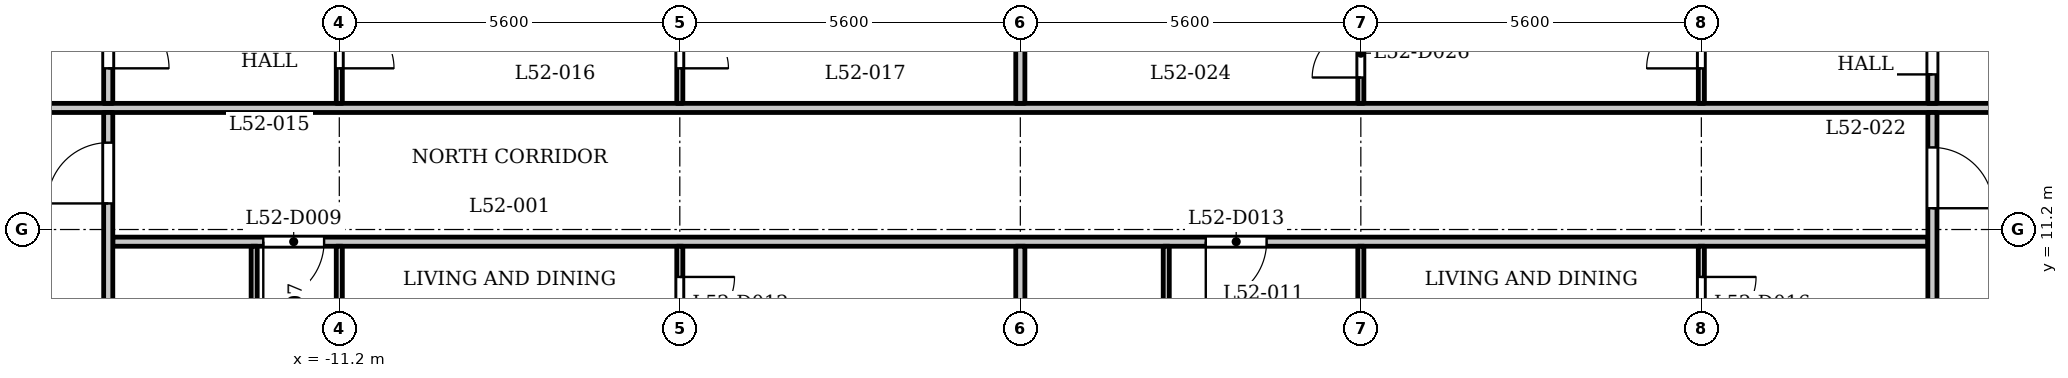
"""IFC4 building model, lengths in metres.
Left out: names, types, materials, properties, quantities, classifications, styles, units other than length and angle.
Written with IfcOpenShell. Run it as: python <this file> out.ifc"""

import sys

from ifc_helpers import new_model, si_unit, direction, frame, frame_2d, origin, place, context, subcontext, project, spatial, rectangle, extrude, element, fill, save


model = new_model("IFC4")
c1 = context("Model", 3, precision=1e-05, world=origin(), true_north=direction((0.0, 1.0)))
c2 = subcontext(c1, "Body", "Model", "MODEL_VIEW")
j1 = project(units=[si_unit("LENGTHUNIT", "METRE"), si_unit("PLANEANGLEUNIT", "RADIAN")], contexts=[c1])
p1 = place(None, origin())
s1 = spatial("IfcSite", under=j1, at=p1, CompositionType="ELEMENT")
p2 = place(p1, origin())
s2 = spatial("IfcBuilding", under=s1, at=p2, CompositionType="ELEMENT")
p3 = place(p2, frame((0.0, 0.0, 202.9)))
s3 = spatial("IfcBuildingStorey", under=s2, at=p3, CompositionType="ELEMENT", Elevation=202.9)
p4 = place(p3, frame((-14.925, 11.0, 0.0), z_axis=(0.0, 0.0, 1.0), x_axis=(1.0, 0.0, 0.0)))
e1 = element("IfcWall", 1, at=p4, inside=s3, PredefinedType="PARTITIONING", context=c2, shape_type="SweptSolid", body=[
    extrude(rectangle(XDim=29.85, YDim=0.15, at=frame_2d((14.925, 0.0))), origin(), (0.0, 0.0, 1.0), 3.2),
])
p5 = place(p4, frame((2.475, 0.0, 0.0)))
e2 = element("IfcOpeningElement", 2, at=p5, cuts=e1, PredefinedType="OPENING", context=c2, shape_type="SweptSolid", body=[
    extrude(rectangle(XDim=1.0, YDim=2.1, at=frame_2d((0.5, 1.05))), frame((0.0, 0.085, 0.0), z_axis=(0.0, -1.0, 0.0), x_axis=(1.0, 0.0, 0.0)), (0.0, 0.0, 1.0), 0.17),
])
p6 = place(p4, frame((17.975, 0.0, 0.0)))
e3 = element("IfcOpeningElement", 3, at=p6, cuts=e1, PredefinedType="OPENING", context=c2, shape_type="SweptSolid", body=[
    extrude(rectangle(XDim=1.0, YDim=2.1, at=frame_2d((0.5, 1.05))), frame((0.0, 0.085, 0.0), z_axis=(0.0, -1.0, 0.0), x_axis=(1.0, 0.0, 0.0)), (0.0, 0.0, 1.0), 0.17),
])
p7 = place(p3, frame((-17.4, 13.2, 0.0), z_axis=(0.0, 0.0, 1.0), x_axis=(1.0, 0.0, 0.0)))
e4 = element("IfcWall", 4, at=p7, inside=s3, PredefinedType="PARTITIONING", context=c2, shape_type="SweptSolid", body=[
    extrude(rectangle(XDim=34.8, YDim=0.15, at=frame_2d((17.4, 0.0))), origin(), (0.0, 0.0, 1.0), 3.2),
])
p8 = place(p7, frame((0.25, 0.0, 0.0)))
e5 = element("IfcOpeningElement", 5, at=p8, cuts=e4, PredefinedType="OPENING", context=c2, shape_type="SweptSolid", body=[
    extrude(rectangle(XDim=1.0, YDim=2.1, at=frame_2d((0.5, 1.05))), frame((0.0, 0.085, 0.0), z_axis=(0.0, -1.0, 0.0), x_axis=(1.0, 0.0, 0.0)), (0.0, 0.0, 1.0), 0.17),
])
p9 = place(p7, frame((33.65, 0.0, 0.0)))
e6 = element("IfcOpeningElement", 6, at=p9, cuts=e4, PredefinedType="OPENING", context=c2, shape_type="SweptSolid", body=[
    extrude(rectangle(XDim=1.0, YDim=2.1, at=frame_2d((0.5, 1.05))), frame((0.0, 0.085, 0.0), z_axis=(0.0, -1.0, 0.0), x_axis=(1.0, 0.0, 0.0)), (0.0, 0.0, 1.0), 0.17),
])
p10 = place(p3, frame((-15.0, 6.769, 0.0), z_axis=(0.0, 0.0, 1.0), x_axis=(0.0, 1.0, 0.0)))
e7 = element("IfcWall", 7, at=p10, inside=s3, PredefinedType="PARTITIONING", context=c2, shape_type="SweptSolid", body=[
    extrude(rectangle(XDim=6.356, YDim=0.15, at=frame_2d((3.178, 0.0))), origin(), (0.0, 0.0, 1.0), 3.2),
])
p11 = place(p10, frame((4.86, 0.0, 0.0)))
e8 = element("IfcOpeningElement", 8, at=p11, cuts=e7, PredefinedType="OPENING", context=c2, shape_type="SweptSolid", body=[
    extrude(rectangle(XDim=1.0, YDim=2.1, at=frame_2d((0.5, 1.05))), frame((0.0, 0.085, 0.0), z_axis=(0.0, -1.0, 0.0), x_axis=(1.0, 0.0, 0.0)), (0.0, 0.0, 1.0), 0.17),
])
p12 = place(p3, frame((-15.0, 13.275, 0.0), z_axis=(0.0, 0.0, 1.0), x_axis=(0.0, 1.0, 0.0)))
e9 = element("IfcWall", 9, at=p12, inside=s3, PredefinedType="PARTITIONING", context=c2, shape_type="SweptSolid", body=[
    extrude(rectangle(XDim=2.05, YDim=0.15, at=frame_2d((1.025, 0.0))), origin(), (0.0, 0.0, 1.0), 3.2),
])
p13 = place(p12, frame((0.576, 0.0, 0.0)))
e10 = element("IfcOpeningElement", 10, at=p13, cuts=e9, PredefinedType="OPENING", context=c2, shape_type="SweptSolid", body=[
    extrude(rectangle(XDim=1.0, YDim=2.1, at=frame_2d((0.5, 1.05))), frame((0.0, 0.085, 0.0), z_axis=(0.0, -1.0, 0.0), x_axis=(1.0, 0.0, 0.0)), (0.0, 0.0, 1.0), 0.17),
])
p14 = place(p3, frame((-12.6, 7.32, 0.0), z_axis=(0.0, 0.0, 1.0), x_axis=(0.0, 1.0, 0.0)))
e11 = element("IfcWall", 11, at=p14, inside=s3, PredefinedType="PARTITIONING", context=c2, shape_type="SweptSolid", body=[
    extrude(rectangle(XDim=3.605, YDim=0.1, at=frame_2d((1.802, 0.0))), origin(), (0.0, 0.0, 1.0), 3.2),
])
p15 = place(p14, frame((1.729, 0.0, 0.0)))
e12 = element("IfcOpeningElement", 12, at=p15, cuts=e11, PredefinedType="OPENING", context=c2, shape_type="SweptSolid", body=[
    extrude(rectangle(XDim=0.8, YDim=2.1, at=frame_2d((0.4, 1.05))), frame((0.0, 0.06, 0.0), z_axis=(0.0, -1.0, 0.0), x_axis=(1.0, 0.0, 0.0)), (0.0, 0.0, 1.0), 0.12),
])
p16 = place(p3, frame((-11.2, 7.32, 0.0), z_axis=(0.0, 0.0, 1.0), x_axis=(0.0, 1.0, 0.0)))
e13 = element("IfcWall", 13, at=p16, inside=s3, PredefinedType="PARTITIONING", context=c2, shape_type="SweptSolid", body=[
    extrude(rectangle(XDim=3.605, YDim=0.1, at=frame_2d((1.802, 0.0))), origin(), (0.0, 0.0, 1.0), 3.2),
])
p17 = place(p16, frame((1.7, 0.0, 0.0)))
e14 = element("IfcOpeningElement", 14, at=p17, cuts=e13, PredefinedType="OPENING", context=c2, shape_type="SweptSolid", body=[
    extrude(rectangle(XDim=0.9, YDim=2.1, at=frame_2d((0.45, 1.05))), frame((0.0, 0.06, 0.0), z_axis=(0.0, -1.0, 0.0), x_axis=(1.0, 0.0, 0.0)), (0.0, 0.0, 1.0), 0.12),
])
p18 = place(p3, frame((-11.2, 13.275, 0.0), z_axis=(0.0, 0.0, 1.0), x_axis=(0.0, 1.0, 0.0)))
e15 = element("IfcWall", 15, at=p18, inside=s3, PredefinedType="PARTITIONING", context=c2, shape_type="SweptSolid", body=[
    extrude(rectangle(XDim=2.575, YDim=0.1, at=frame_2d((1.288, 0.0))), origin(), (0.0, 0.0, 1.0), 3.2),
])
p19 = place(p18, frame((0.576, 0.0, 0.0)))
e16 = element("IfcOpeningElement", 16, at=p19, cuts=e15, PredefinedType="OPENING", context=c2, shape_type="SweptSolid", body=[
    extrude(rectangle(XDim=0.9, YDim=2.1, at=frame_2d((0.45, 1.05))), frame((0.0, 0.06, 0.0), z_axis=(0.0, -1.0, 0.0), x_axis=(1.0, 0.0, 0.0)), (0.0, 0.0, 1.0), 0.12),
])
p20 = place(p3, frame((-5.6, 7.32, 0.0), z_axis=(0.0, 0.0, 1.0), x_axis=(0.0, 1.0, 0.0)))
e17 = element("IfcWall", 17, at=p20, inside=s3, PredefinedType="PARTITIONING", context=c2, shape_type="SweptSolid", body=[
    extrude(rectangle(XDim=3.605, YDim=0.1, at=frame_2d((1.802, 0.0))), origin(), (0.0, 0.0, 1.0), 3.2),
])
p21 = place(p20, frame((2.2, 0.0, 0.0)))
e18 = element("IfcOpeningElement", 18, at=p21, cuts=e17, PredefinedType="OPENING", context=c2, shape_type="SweptSolid", body=[
    extrude(rectangle(XDim=0.9, YDim=2.1, at=frame_2d((0.45, 1.05))), frame((0.0, 0.06, 0.0), z_axis=(0.0, -1.0, 0.0), x_axis=(1.0, 0.0, 0.0)), (0.0, 0.0, 1.0), 0.12),
])
p22 = place(p3, frame((-5.6, 13.275, 0.0), z_axis=(0.0, 0.0, 1.0), x_axis=(0.0, 1.0, 0.0)))
e19 = element("IfcWall", 19, at=p22, inside=s3, PredefinedType="PARTITIONING", context=c2, shape_type="SweptSolid", body=[
    extrude(rectangle(XDim=2.575, YDim=0.1, at=frame_2d((1.288, 0.0))), origin(), (0.0, 0.0, 1.0), 3.2),
])
p23 = place(p22, frame((0.576, 0.0, 0.0)))
e20 = element("IfcOpeningElement", 20, at=p23, cuts=e19, PredefinedType="OPENING", context=c2, shape_type="SweptSolid", body=[
    extrude(rectangle(XDim=0.8, YDim=2.1, at=frame_2d((0.4, 1.05))), frame((0.0, 0.06, 0.0), z_axis=(0.0, -1.0, 0.0), x_axis=(1.0, 0.0, 0.0)), (0.0, 0.0, 1.0), 0.12),
])
p24 = place(p3, frame((0.0, 7.32, 0.0), z_axis=(0.0, 0.0, 1.0), x_axis=(0.0, 1.0, 0.0)))
e21 = element("IfcWall", 21, at=p24, inside=s3, PredefinedType="PARTITIONING", context=c2, shape_type="SweptSolid", body=[
    extrude(rectangle(XDim=3.605, YDim=0.15, at=frame_2d((1.802, 0.0))), origin(), (0.0, 0.0, 1.0), 3.2),
])
p25 = place(p3, frame((0.0, 13.275, 0.0), z_axis=(0.0, 0.0, 1.0), x_axis=(0.0, 1.0, 0.0)))
e22 = element("IfcWall", 22, at=p25, inside=s3, PredefinedType="PARTITIONING", context=c2, shape_type="SweptSolid", body=[
    extrude(rectangle(XDim=2.575, YDim=0.15, at=frame_2d((1.288, 0.0))), origin(), (0.0, 0.0, 1.0), 3.2),
])
p26 = place(p3, frame((2.4, 7.32, 0.0), z_axis=(0.0, 0.0, 1.0), x_axis=(0.0, 1.0, 0.0)))
e23 = element("IfcWall", 23, at=p26, inside=s3, PredefinedType="PARTITIONING", context=c2, shape_type="SweptSolid", body=[
    extrude(rectangle(XDim=3.605, YDim=0.1, at=frame_2d((1.802, 0.0))), origin(), (0.0, 0.0, 1.0), 3.2),
])
p27 = place(p26, frame((0.479, 0.0, 0.0)))
e24 = element("IfcOpeningElement", 24, at=p27, cuts=e23, PredefinedType="OPENING", context=c2, shape_type="SweptSolid", body=[
    extrude(rectangle(XDim=0.8, YDim=2.1, at=frame_2d((0.4, 1.05))), frame((0.0, 0.06, 0.0), z_axis=(0.0, -1.0, 0.0), x_axis=(1.0, 0.0, 0.0)), (0.0, 0.0, 1.0), 0.12),
])
p28 = place(p3, frame((5.6, 7.32, 0.0), z_axis=(0.0, 0.0, 1.0), x_axis=(0.0, 1.0, 0.0)))
e25 = element("IfcWall", 25, at=p28, inside=s3, PredefinedType="PARTITIONING", context=c2, shape_type="SweptSolid", body=[
    extrude(rectangle(XDim=3.605, YDim=0.1, at=frame_2d((1.802, 0.0))), origin(), (0.0, 0.0, 1.0), 3.2),
])
p29 = place(p28, frame((1.7, 0.0, 0.0)))
e26 = element("IfcOpeningElement", 26, at=p29, cuts=e25, PredefinedType="OPENING", context=c2, shape_type="SweptSolid", body=[
    extrude(rectangle(XDim=0.9, YDim=2.1, at=frame_2d((0.45, 1.05))), frame((0.0, 0.06, 0.0), z_axis=(0.0, -1.0, 0.0), x_axis=(1.0, 0.0, 0.0)), (0.0, 0.0, 1.0), 0.12),
])
p30 = place(p3, frame((5.6, 13.275, 0.0), z_axis=(0.0, 0.0, 1.0), x_axis=(0.0, 1.0, 0.0)))
e27 = element("IfcWall", 27, at=p30, inside=s3, PredefinedType="PARTITIONING", context=c2, shape_type="SweptSolid", body=[
    extrude(rectangle(XDim=2.575, YDim=0.1, at=frame_2d((1.288, 0.0))), origin(), (0.0, 0.0, 1.0), 3.2),
])
p31 = place(p30, frame((0.425, 0.0, 0.0)))
e28 = element("IfcOpeningElement", 28, at=p31, cuts=e27, PredefinedType="OPENING", context=c2, shape_type="SweptSolid", body=[
    extrude(rectangle(XDim=0.8, YDim=2.1, at=frame_2d((0.4, 1.05))), frame((0.0, 0.06, 0.0), z_axis=(0.0, -1.0, 0.0), x_axis=(1.0, 0.0, 0.0)), (0.0, 0.0, 1.0), 0.12),
])
p32 = place(p3, frame((11.2, 7.32, 0.0), z_axis=(0.0, 0.0, 1.0), x_axis=(0.0, 1.0, 0.0)))
e29 = element("IfcWall", 29, at=p32, inside=s3, PredefinedType="PARTITIONING", context=c2, shape_type="SweptSolid", body=[
    extrude(rectangle(XDim=3.605, YDim=0.1, at=frame_2d((1.802, 0.0))), origin(), (0.0, 0.0, 1.0), 3.2),
])
p33 = place(p32, frame((2.2, 0.0, 0.0)))
e30 = element("IfcOpeningElement", 30, at=p33, cuts=e29, PredefinedType="OPENING", context=c2, shape_type="SweptSolid", body=[
    extrude(rectangle(XDim=0.9, YDim=2.1, at=frame_2d((0.45, 1.05))), frame((0.0, 0.06, 0.0), z_axis=(0.0, -1.0, 0.0), x_axis=(1.0, 0.0, 0.0)), (0.0, 0.0, 1.0), 0.12),
])
p34 = place(p3, frame((11.2, 13.275, 0.0), z_axis=(0.0, 0.0, 1.0), x_axis=(0.0, 1.0, 0.0)))
e31 = element("IfcWall", 31, at=p34, inside=s3, PredefinedType="PARTITIONING", context=c2, shape_type="SweptSolid", body=[
    extrude(rectangle(XDim=2.575, YDim=0.1, at=frame_2d((1.288, 0.0))), origin(), (0.0, 0.0, 1.0), 3.2),
])
p35 = place(p34, frame((0.575, 0.0, 0.0)))
e32 = element("IfcOpeningElement", 32, at=p35, cuts=e31, PredefinedType="OPENING", context=c2, shape_type="SweptSolid", body=[
    extrude(rectangle(XDim=0.9, YDim=2.1, at=frame_2d((0.45, 1.05))), frame((0.0, 0.06, 0.0), z_axis=(0.0, -1.0, 0.0), x_axis=(1.0, 0.0, 0.0)), (0.0, 0.0, 1.0), 0.12),
])
p36 = place(p3, frame((15.0, 6.769, 0.0), z_axis=(0.0, 0.0, 1.0), x_axis=(0.0, 1.0, 0.0)))
e33 = element("IfcWall", 33, at=p36, inside=s3, PredefinedType="PARTITIONING", context=c2, shape_type="SweptSolid", body=[
    extrude(rectangle(XDim=6.356, YDim=0.15, at=frame_2d((3.178, 0.0))), origin(), (0.0, 0.0, 1.0), 3.2),
])
p37 = place(p36, frame((4.781, 0.0, 0.0)))
e34 = element("IfcOpeningElement", 34, at=p37, cuts=e33, PredefinedType="OPENING", context=c2, shape_type="SweptSolid", body=[
    extrude(rectangle(XDim=1.0, YDim=2.1, at=frame_2d((0.5, 1.05))), frame((0.0, 0.085, 0.0), z_axis=(0.0, -1.0, 0.0), x_axis=(1.0, 0.0, 0.0)), (0.0, 0.0, 1.0), 0.17),
])
p38 = place(p3, frame((15.0, 13.275, 0.0), z_axis=(0.0, 0.0, 1.0), x_axis=(0.0, 1.0, 0.0)))
e35 = element("IfcWall", 35, at=p38, inside=s3, PredefinedType="PARTITIONING", context=c2, shape_type="SweptSolid", body=[
    extrude(rectangle(XDim=2.05, YDim=0.15, at=frame_2d((1.025, 0.0))), origin(), (0.0, 0.0, 1.0), 3.2),
])
p39 = place(p38, frame((0.476, 0.0, 0.0)))
e36 = element("IfcOpeningElement", 36, at=p39, cuts=e35, PredefinedType="OPENING", context=c2, shape_type="SweptSolid", body=[
    extrude(rectangle(XDim=1.0, YDim=2.1, at=frame_2d((0.5, 1.05))), frame((0.0, 0.085, 0.0), z_axis=(0.0, -1.0, 0.0), x_axis=(1.0, 0.0, 0.0)), (0.0, 0.0, 1.0), 0.17),
])
p40 = place(p11, origin())
e37 = element("IfcDoor", 37, at=p40, inside=s3, OperationType="SINGLE_SWING_RIGHT", PredefinedType="DOOR", context=c2, shape_type="SweptSolid", body=[
    extrude(rectangle(XDim=1.0, YDim=2.1, at=frame_2d((0.5, 1.05))), frame((0.0, 0.025, 0.0), z_axis=(0.0, -1.0, 0.0), x_axis=(1.0, 0.0, 0.0)), (0.0, 0.0, 1.0), 0.05),
])
fill(e8, e37)
p41 = place(p37, origin())
e38 = element("IfcDoor", 38, at=p41, inside=s3, OperationType="SINGLE_SWING_LEFT", PredefinedType="DOOR", context=c2, shape_type="SweptSolid", body=[
    extrude(rectangle(XDim=1.0, YDim=2.1, at=frame_2d((0.5, 1.05))), frame((0.0, 0.025, 0.0), z_axis=(0.0, -1.0, 0.0), x_axis=(1.0, 0.0, 0.0)), (0.0, 0.0, 1.0), 0.05),
])
fill(e34, e38)
p42 = place(p5, origin())
e39 = element("IfcDoor", 39, at=p42, inside=s3, OperationType="SINGLE_SWING_LEFT", PredefinedType="DOOR", context=c2, shape_type="SweptSolid", body=[
    extrude(rectangle(XDim=1.0, YDim=2.1, at=frame_2d((0.5, 1.05))), frame((0.0, 0.025, 0.0), z_axis=(0.0, -1.0, 0.0), x_axis=(1.0, 0.0, 0.0)), (0.0, 0.0, 1.0), 0.05),
])
fill(e2, e39)
p43 = place(p21, origin())
e40 = element("IfcDoor", 40, at=p43, inside=s3, OperationType="SINGLE_SWING_RIGHT", PredefinedType="DOOR", context=c2, shape_type="SweptSolid", body=[
    extrude(rectangle(XDim=0.9, YDim=2.1, at=frame_2d((0.45, 1.05))), frame((0.0, 0.025, 0.0), z_axis=(0.0, -1.0, 0.0), x_axis=(1.0, 0.0, 0.0)), (0.0, 0.0, 1.0), 0.05),
])
fill(e18, e40)
p44 = place(p6, origin())
e41 = element("IfcDoor", 41, at=p44, inside=s3, OperationType="SINGLE_SWING_LEFT", PredefinedType="DOOR", context=c2, shape_type="SweptSolid", body=[
    extrude(rectangle(XDim=1.0, YDim=2.1, at=frame_2d((0.5, 1.05))), frame((0.0, 0.025, 0.0), z_axis=(0.0, -1.0, 0.0), x_axis=(1.0, 0.0, 0.0)), (0.0, 0.0, 1.0), 0.05),
])
fill(e3, e41)
p45 = place(p33, origin())
e42 = element("IfcDoor", 42, at=p45, inside=s3, OperationType="SINGLE_SWING_RIGHT", PredefinedType="DOOR", context=c2, shape_type="SweptSolid", body=[
    extrude(rectangle(XDim=0.9, YDim=2.1, at=frame_2d((0.45, 1.05))), frame((0.0, 0.025, 0.0), z_axis=(0.0, -1.0, 0.0), x_axis=(1.0, 0.0, 0.0)), (0.0, 0.0, 1.0), 0.05),
])
fill(e30, e42)
p46 = place(p13, origin())
e43 = element("IfcDoor", 43, at=p46, inside=s3, OperationType="SINGLE_SWING_LEFT", PredefinedType="DOOR", context=c2, shape_type="SweptSolid", body=[
    extrude(rectangle(XDim=1.0, YDim=2.1, at=frame_2d((0.5, 1.05))), frame((0.0, 0.025, 0.0), z_axis=(0.0, -1.0, 0.0), x_axis=(1.0, 0.0, 0.0)), (0.0, 0.0, 1.0), 0.05),
])
fill(e10, e43)
p47 = place(p19, origin())
e44 = element("IfcDoor", 44, at=p47, inside=s3, OperationType="SINGLE_SWING_LEFT", PredefinedType="DOOR", context=c2, shape_type="SweptSolid", body=[
    extrude(rectangle(XDim=0.9, YDim=2.1, at=frame_2d((0.45, 1.05))), frame((0.0, 0.025, 0.0), z_axis=(0.0, -1.0, 0.0), x_axis=(1.0, 0.0, 0.0)), (0.0, 0.0, 1.0), 0.05),
])
fill(e16, e44)
p48 = place(p23, origin())
e45 = element("IfcDoor", 45, at=p48, inside=s3, OperationType="SINGLE_SWING_LEFT", PredefinedType="DOOR", context=c2, shape_type="SweptSolid", body=[
    extrude(rectangle(XDim=0.8, YDim=2.1, at=frame_2d((0.4, 1.05))), frame((0.0, 0.025, 0.0), z_axis=(0.0, -1.0, 0.0), x_axis=(1.0, 0.0, 0.0)), (0.0, 0.0, 1.0), 0.05),
])
fill(e20, e45)
p49 = place(p39, origin())
e46 = element("IfcDoor", 46, at=p49, inside=s3, OperationType="SINGLE_SWING_RIGHT", PredefinedType="DOOR", context=c2, shape_type="SweptSolid", body=[
    extrude(rectangle(XDim=1.0, YDim=2.1, at=frame_2d((0.5, 1.05))), frame((0.0, 0.025, 0.0), z_axis=(0.0, -1.0, 0.0), x_axis=(1.0, 0.0, 0.0)), (0.0, 0.0, 1.0), 0.05),
])
fill(e36, e46)
p50 = place(p35, origin())
e47 = element("IfcDoor", 47, at=p50, inside=s3, OperationType="SINGLE_SWING_RIGHT", PredefinedType="DOOR", context=c2, shape_type="SweptSolid", body=[
    extrude(rectangle(XDim=0.9, YDim=2.1, at=frame_2d((0.45, 1.05))), frame((0.0, 0.025, 0.0), z_axis=(0.0, -1.0, 0.0), x_axis=(1.0, 0.0, 0.0)), (0.0, 0.0, 1.0), 0.05),
])
fill(e32, e47)
p51 = place(p31, origin())
e48 = element("IfcDoor", 48, at=p51, inside=s3, OperationType="SINGLE_SWING_RIGHT", PredefinedType="DOOR", context=c2, shape_type="SweptSolid", body=[
    extrude(rectangle(XDim=0.8, YDim=2.1, at=frame_2d((0.4, 1.05))), frame((0.0, 0.025, 0.0), z_axis=(0.0, -1.0, 0.0), x_axis=(1.0, 0.0, 0.0)), (0.0, 0.0, 1.0), 0.05),
])
fill(e28, e48)
save(model, sys.argv[1])
